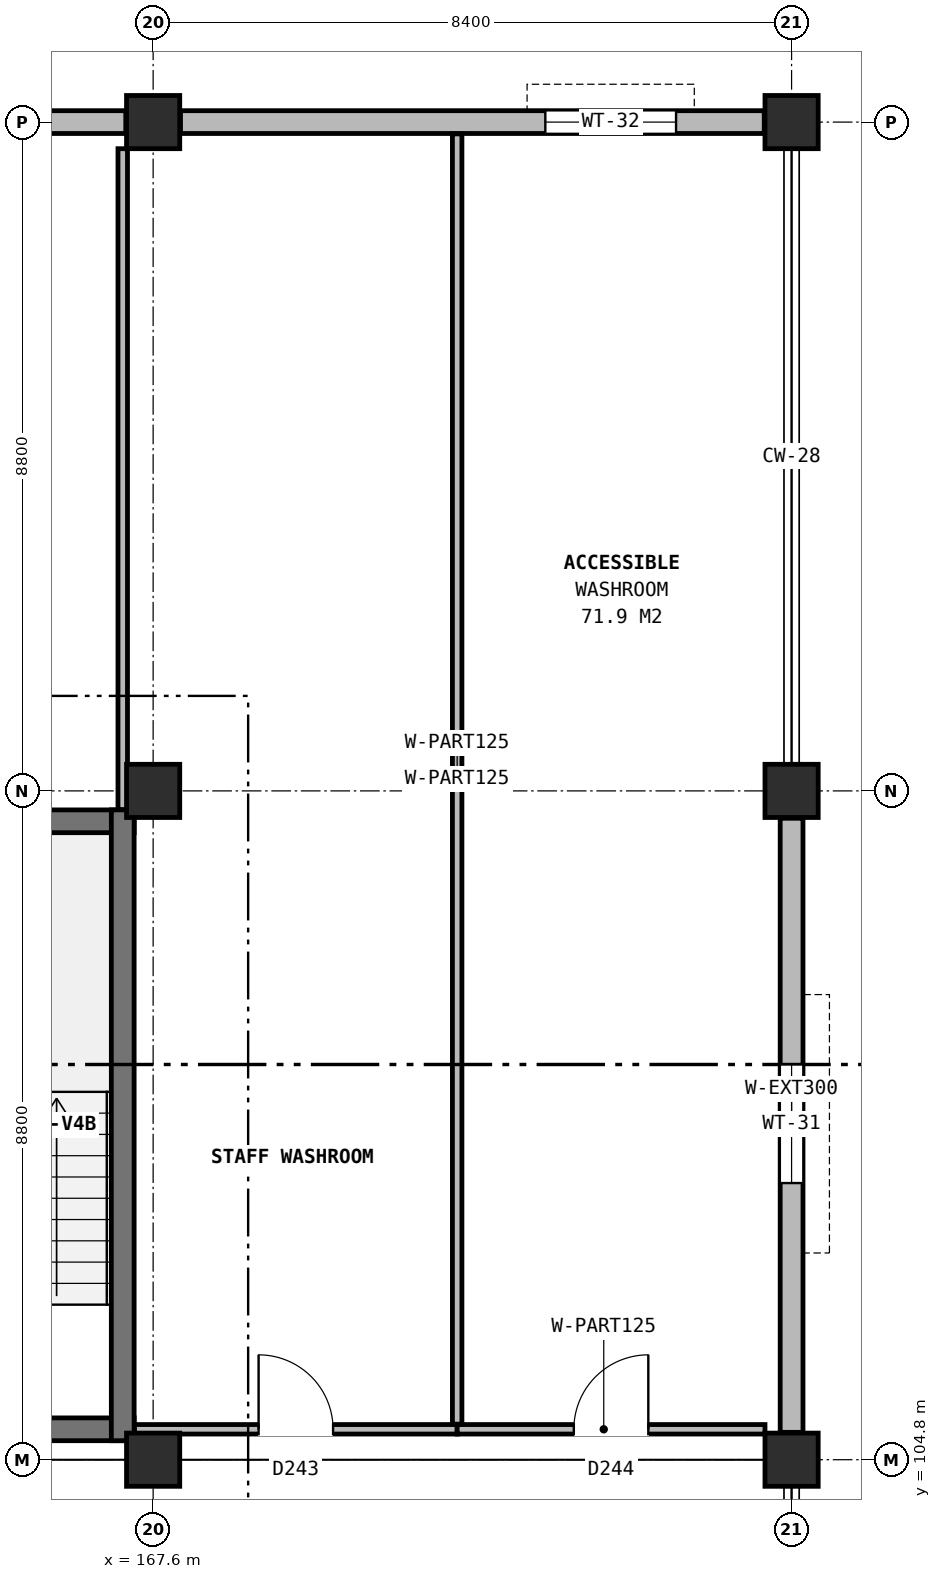
"""IFC4 building model, lengths in metres.
Left out: names, types, materials, properties, quantities, classifications, styles, units other than length and angle.
Written with IfcOpenShell. Run it as: python <this file> out.ifc"""

import sys

from ifc_helpers import new_model, si_unit, direction, frame, frame_2d, origin, origin_2d, place, context, subcontext, project, spatial, rectangle, extrude, element, fill, save


model = new_model("IFC4")
c1 = context("Model", 3, precision=1e-05, world=origin(), true_north=direction((0.0, 1.0)))
c2 = subcontext(c1, "Body", "Model", "MODEL_VIEW")
j1 = project(units=[si_unit("LENGTHUNIT", "METRE"), si_unit("PLANEANGLEUNIT", "RADIAN")], contexts=[c1])
p1 = place(None, origin())
s1 = spatial("IfcSite", under=j1, at=p1, CompositionType="ELEMENT")
p2 = place(p1, origin())
s2 = spatial("IfcBuilding", under=s1, at=p2, CompositionType="ELEMENT")
p3 = place(p2, frame((0.0, 0.0, 40.6)))
s3 = spatial("IfcBuildingStorey", under=s2, at=p3, CompositionType="ELEMENT", Elevation=40.6)
for number, where, z_axis, x_axis in (
    (1, (167.6, 104.8, 0.0), (0.0, 0.0, 1.0), (1.0, 0.0, 0.0)),
    (2, (167.6, 113.6, 0.0), (0.0, 0.0, 1.0), (1.0, 0.0, 0.0)),
    (3, (167.6, 122.4, 0.0), (0.0, 0.0, 1.0), (1.0, 0.0, 0.0)),
    (4, (176.0, 104.8, 0.0), (0.0, 0.0, 1.0), (1.0, 0.0, 0.0)),
    (5, (176.0, 113.6, 0.0), (0.0, 0.0, 1.0), (1.0, 0.0, 0.0)),
    (6, (176.0, 122.4, 0.0), (0.0, 0.0, 1.0), (1.0, 0.0, 0.0)),
):
    element("IfcColumn", number, at=place(p3, frame(where, z_axis=z_axis, x_axis=x_axis)), inside=s3, PredefinedType="COLUMN", context=c2, shape_type="SweptSolid", body=[
        extrude(rectangle(XDim=0.7, YDim=0.7, at=origin_2d()), origin(), (0.0, 0.0, 1.0), 3.8),
    ])
p4 = place(p3, frame((176.0, 105.16, 0.0), z_axis=(0.0, 0.0, 1.0), x_axis=(0.0, 1.0, 0.0)))
e7 = element("IfcWall", 7, at=p4, inside=s3, PredefinedType="SOLIDWALL", context=c2, shape_type="SweptSolid", body=[
    extrude(rectangle(XDim=8.08, YDim=0.3, at=frame_2d((4.04, 0.0))), origin(), (0.0, 0.0, 1.0), 3.05),
])
p5 = place(p4, frame((3.28, 0.0, 0.9)))
e8 = element("IfcOpeningElement", 8, at=p5, cuts=e7, PredefinedType="OPENING", context=c2, shape_type="SweptSolid", body=[
    extrude(rectangle(XDim=1.56, YDim=1.88, at=frame_2d((0.78, 0.94))), frame((0.0, 0.16, 0.0), z_axis=(0.0, -1.0, 0.0), x_axis=(1.0, 0.0, 0.0)), (0.0, 0.0, 1.0), 0.32),
])
p6 = place(p3, frame((175.64, 122.4, 0.0), z_axis=(0.0, 0.0, 1.0), x_axis=(-1.0, 0.0, 0.0)))
e9 = element("IfcWall", 9, at=p6, inside=s3, PredefinedType="SOLIDWALL", context=c2, shape_type="SweptSolid", body=[
    extrude(rectangle(XDim=7.68, YDim=0.3, at=frame_2d((3.84, 0.0))), origin(), (0.0, 0.0, 1.0), 3.05),
])
p7 = place(p6, frame((1.16, 0.0, 0.9)))
e10 = element("IfcOpeningElement", 10, at=p7, cuts=e9, PredefinedType="OPENING", context=c2, shape_type="SweptSolid", body=[
    extrude(rectangle(XDim=1.72, YDim=1.92, at=frame_2d((0.86, 0.96))), frame((0.0, 0.16, 0.0), z_axis=(0.0, -1.0, 0.0), x_axis=(1.0, 0.0, 0.0)), (0.0, 0.0, 1.0), 0.32),
])
p8 = place(p3, frame((167.24, 122.4, 0.0), z_axis=(0.0, 0.0, 1.0), x_axis=(-1.0, 0.0, 0.0)))
e11 = element("IfcWall", 11, at=p8, inside=s3, PredefinedType="SOLIDWALL", context=c2, shape_type="SweptSolid", body=[
    extrude(rectangle(XDim=7.68, YDim=0.3, at=frame_2d((3.84, 0.0))), origin(), (0.0, 0.0, 1.0), 3.05),
])
p9 = place(p8, frame((2.92, 0.0, 0.9)))
e12 = element("IfcOpeningElement", 12, at=p9, cuts=e11, PredefinedType="OPENING", context=c2, shape_type="SweptSolid", body=[
    extrude(rectangle(XDim=1.88, YDim=1.96, at=frame_2d((0.94, 0.98))), frame((0.0, 0.16, 0.0), z_axis=(0.0, -1.0, 0.0), x_axis=(1.0, 0.0, 0.0)), (0.0, 0.0, 1.0), 0.32),
])
p10 = place(p3, frame((163.75, 105.2, 0.0), z_axis=(0.0, 0.0, 1.0), x_axis=(1.0, 0.0, 0.0)))
e13 = element("IfcWall", 13, at=p10, inside=s3, PredefinedType="SHEAR", context=c2, shape_type="SweptSolid", body=[
    extrude(rectangle(XDim=3.6, YDim=0.3, at=frame_2d((1.8, 0.0))), origin(), (0.0, 0.0, 1.0), 3.8),
])
p11 = place(p10, frame((1.05, 0.0, 0.0)))
e14 = element("IfcOpeningElement", 14, at=p11, cuts=e13, PredefinedType="OPENING", context=c2, shape_type="SweptSolid", body=[
    extrude(rectangle(XDim=1.1, YDim=2.2, at=frame_2d((0.55, 1.1))), frame((0.0, 0.16, 0.0), z_axis=(0.0, -1.0, 0.0), x_axis=(1.0, 0.0, 0.0)), (0.0, 0.0, 1.0), 0.32),
])
p12 = place(p3, frame((163.75, 113.2, 0.0), z_axis=(0.0, 0.0, 1.0), x_axis=(1.0, 0.0, 0.0)))
e15 = element("IfcWall", 15, at=p12, inside=s3, PredefinedType="SHEAR", context=c2, shape_type="SweptSolid", body=[
    extrude(rectangle(XDim=3.6, YDim=0.3, at=frame_2d((1.8, 0.0))), origin(), (0.0, 0.0, 1.0), 3.8),
])
p13 = place(p3, frame((167.2, 105.05, 0.0), z_axis=(0.0, 0.0, 1.0), x_axis=(0.0, 1.0, 0.0)))
e16 = element("IfcWall", 16, at=p13, inside=s3, PredefinedType="SHEAR", context=c2, shape_type="SweptSolid", body=[
    extrude(rectangle(XDim=8.3, YDim=0.3, at=frame_2d((4.15, 0.0))), origin(), (0.0, 0.0, 1.0), 3.8),
])
p14 = place(p3, frame((167.355, 105.2, 0.0), z_axis=(0.0, 0.0, 1.0), x_axis=(1.0, 0.0, 0.0)))
e17 = element("IfcWall", 17, at=p14, inside=s3, PredefinedType="PARTITIONING", context=c2, shape_type="SweptSolid", body=[
    extrude(rectangle(XDim=4.245, YDim=0.125, at=frame_2d((2.123, 0.0))), origin(), (0.0, 0.0, 1.0), 3.045),
])
p15 = place(p14, frame((1.633, 0.0, 0.0)))
e18 = element("IfcOpeningElement", 18, at=p15, cuts=e17, PredefinedType="OPENING", context=c2, shape_type="SweptSolid", body=[
    extrude(rectangle(XDim=0.98, YDim=2.1, at=frame_2d((0.49, 1.05))), frame((0.0, 0.073, 0.0), z_axis=(0.0, -1.0, 0.0), x_axis=(1.0, 0.0, 0.0)), (0.0, 0.0, 1.0), 0.145),
])
p16 = place(p3, frame((171.6, 105.2, 0.0), z_axis=(0.0, 0.0, 1.0), x_axis=(1.0, 0.0, 0.0)))
e19 = element("IfcWall", 19, at=p16, inside=s3, PredefinedType="PARTITIONING", context=c2, shape_type="SweptSolid", body=[
    extrude(rectangle(XDim=4.05, YDim=0.125, at=frame_2d((2.025, 0.0))), origin(), (0.0, 0.0, 1.0), 3.045),
])
p17 = place(p16, frame((1.535, 0.0, 0.0)))
e20 = element("IfcOpeningElement", 20, at=p17, cuts=e19, PredefinedType="OPENING", context=c2, shape_type="SweptSolid", body=[
    extrude(rectangle(XDim=0.98, YDim=2.1, at=frame_2d((0.49, 1.05))), frame((0.0, 0.073, 0.0), z_axis=(0.0, -1.0, 0.0), x_axis=(1.0, 0.0, 0.0)), (0.0, 0.0, 1.0), 0.145),
])
p18 = place(p3, frame((167.2, 113.355, 0.0), z_axis=(0.0, 0.0, 1.0), x_axis=(0.0, 1.0, 0.0)))
e21 = element("IfcWall", 21, at=p18, inside=s3, PredefinedType="PARTITIONING", context=c2, shape_type="SweptSolid", body=[
    extrude(rectangle(XDim=8.695, YDim=0.125, at=frame_2d((4.348, 0.0))), origin(), (0.0, 0.0, 1.0), 3.045),
])
p19 = place(p3, frame((171.6, 105.268, 0.0), z_axis=(0.0, 0.0, 1.0), x_axis=(0.0, 1.0, 0.0)))
e22 = element("IfcWall", 22, at=p19, inside=s3, PredefinedType="PARTITIONING", context=c2, shape_type="SweptSolid", body=[
    extrude(rectangle(XDim=16.978, YDim=0.125, at=frame_2d((8.489, 0.0))), origin(), (0.0, 0.0, 1.0), 3.465),
])
p20 = place(p5, origin())
e23 = element("IfcWindow", 23, at=p20, inside=s3, PartitioningType="SINGLE_PANEL", PredefinedType="WINDOW", context=c2, shape_type="SweptSolid", body=[
    extrude(rectangle(XDim=1.56, YDim=1.88, at=frame_2d((0.78, 0.94))), frame((0.0, 0.03, 0.0), z_axis=(0.0, -1.0, 0.0), x_axis=(1.0, 0.0, 0.0)), (0.0, 0.0, 1.0), 0.06),
])
fill(e8, e23)
p21 = place(p7, origin())
e24 = element("IfcWindow", 24, at=p21, inside=s3, PartitioningType="SINGLE_PANEL", PredefinedType="WINDOW", context=c2, shape_type="SweptSolid", body=[
    extrude(rectangle(XDim=1.72, YDim=1.92, at=frame_2d((0.86, 0.96))), frame((0.0, 0.03, 0.0), z_axis=(0.0, -1.0, 0.0), x_axis=(1.0, 0.0, 0.0)), (0.0, 0.0, 1.0), 0.06),
])
fill(e10, e24)
p22 = place(p15, origin())
e25 = element("IfcDoor", 25, at=p22, inside=s3, OperationType="SINGLE_SWING_LEFT", PredefinedType="DOOR", context=c2, shape_type="SweptSolid", body=[
    extrude(rectangle(XDim=0.98, YDim=2.1, at=frame_2d((0.49, 1.05))), frame((0.0, 0.025, 0.0), z_axis=(0.0, -1.0, 0.0), x_axis=(1.0, 0.0, 0.0)), (0.0, 0.0, 1.0), 0.05),
])
fill(e18, e25)
p23 = place(p17, origin())
e26 = element("IfcDoor", 26, at=p23, inside=s3, OperationType="SINGLE_SWING_RIGHT", PredefinedType="DOOR", context=c2, shape_type="SweptSolid", body=[
    extrude(rectangle(XDim=0.98, YDim=2.1, at=frame_2d((0.49, 1.05))), frame((0.0, 0.025, 0.0), z_axis=(0.0, -1.0, 0.0), x_axis=(1.0, 0.0, 0.0)), (0.0, 0.0, 1.0), 0.05),
])
fill(e20, e26)
save(model, sys.argv[1])
